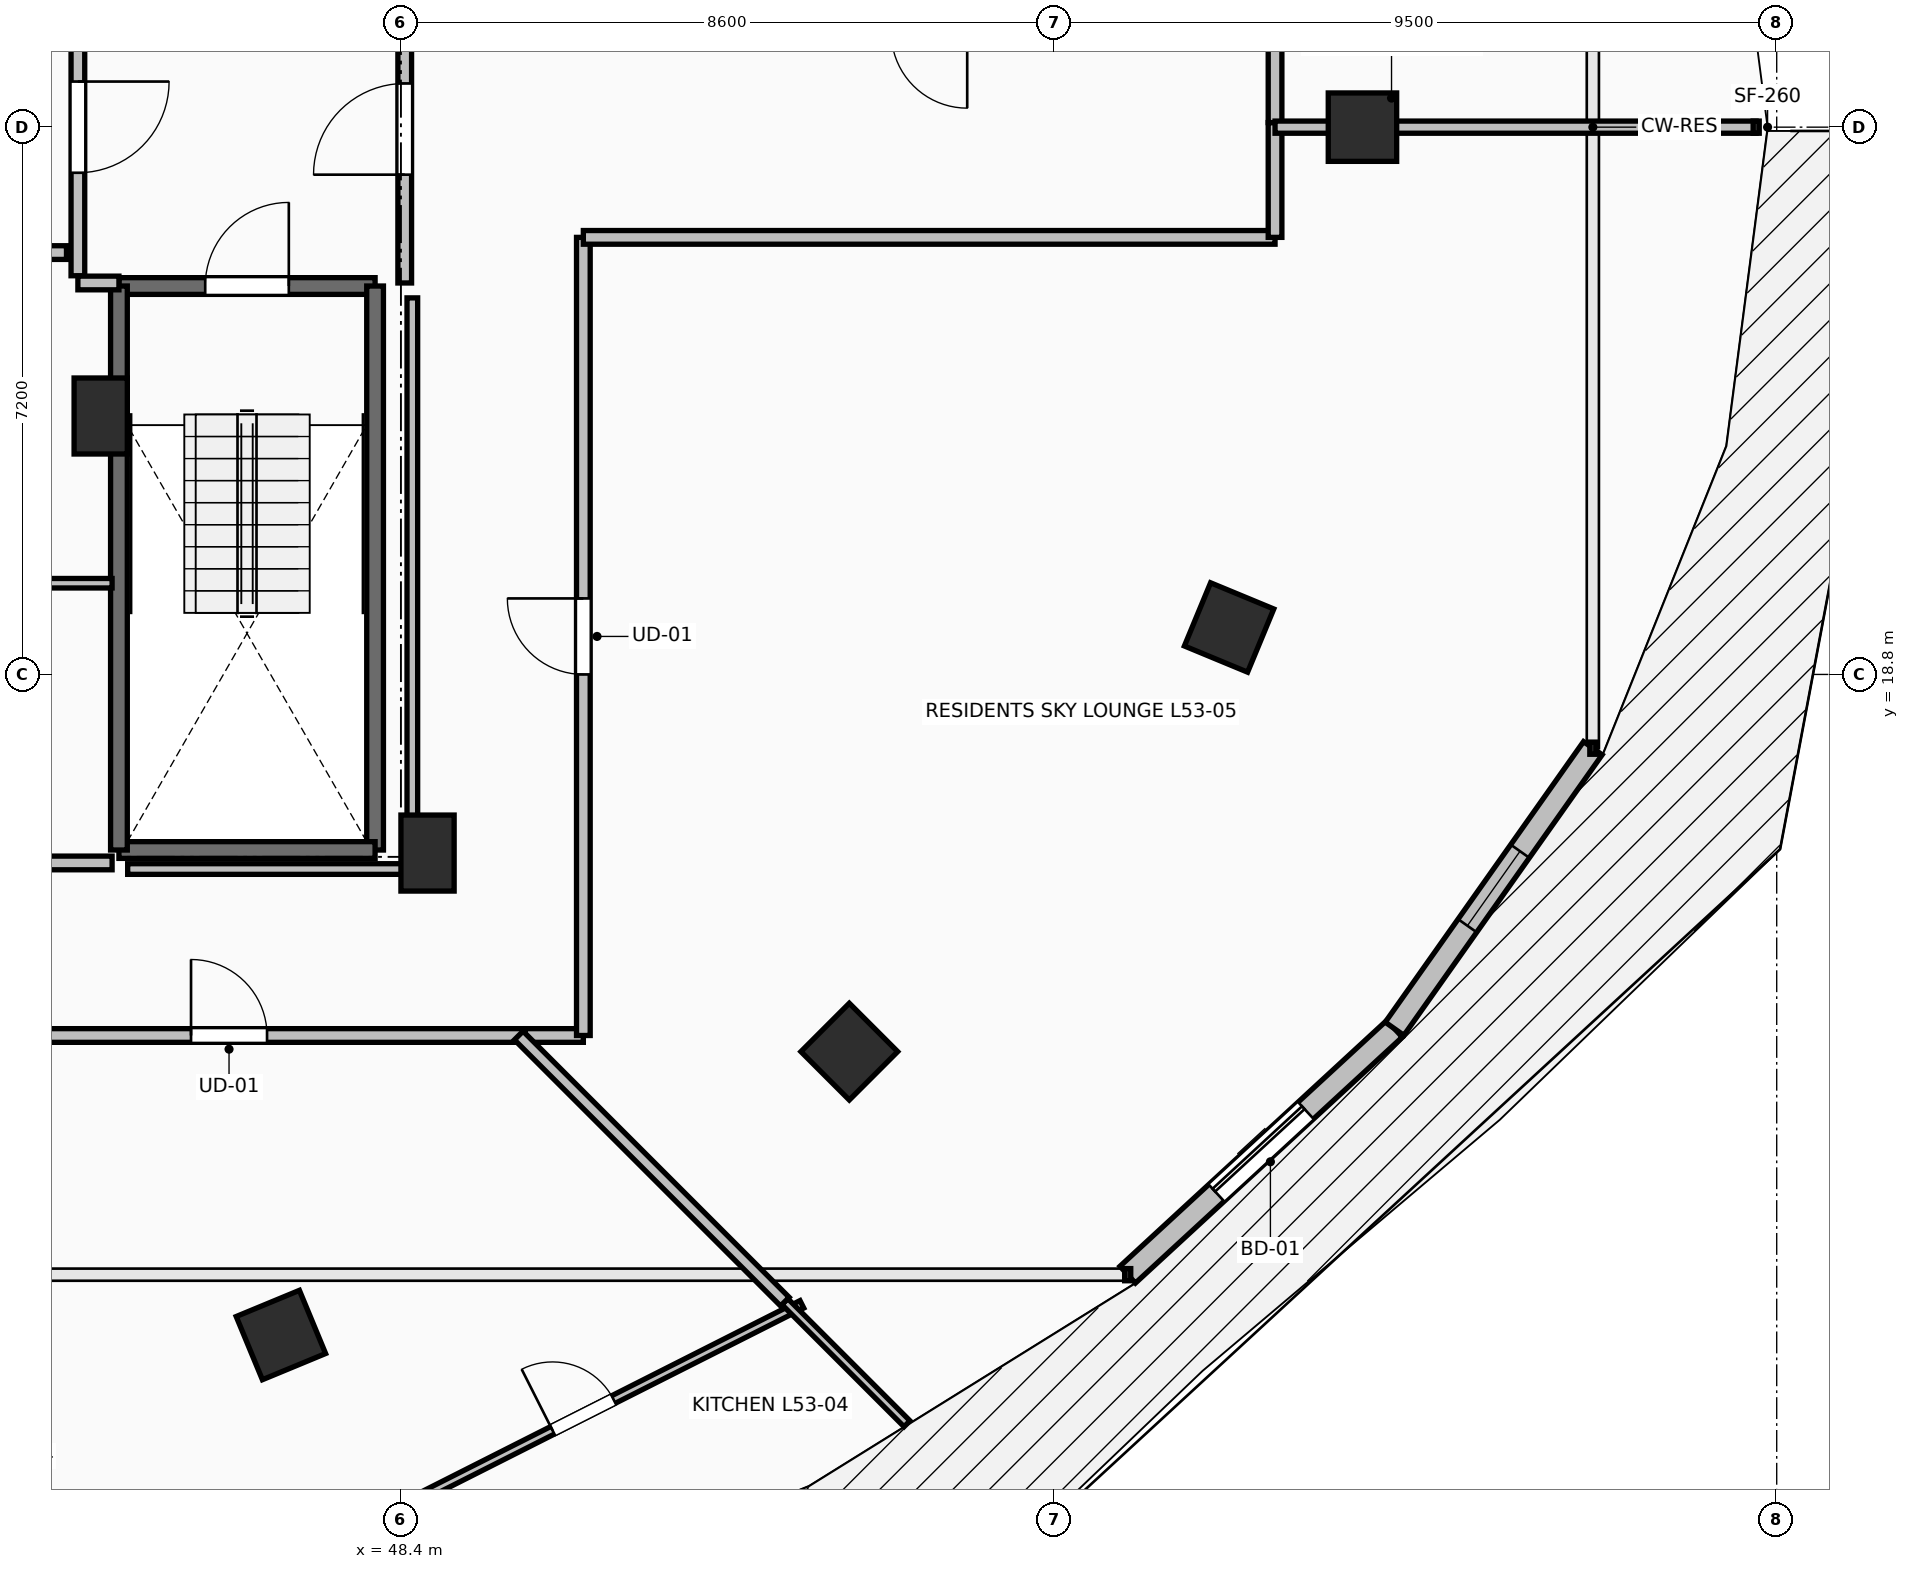
"""IFC4 building model, lengths in metres.
Left out: names, types, materials, properties, quantities, classifications, styles, units other than length and angle.
Written with IfcOpenShell. Run it as: python <this file> out.ifc"""

import sys

from ifc_helpers import new_model, si_unit, direction, frame, frame_2d, origin, origin_2d, place, context, subcontext, project, spatial, rectangle, extrude, element, fill, save


model = new_model("IFC4")
c1 = context("Model", 3, precision=1e-05, world=origin(), true_north=direction((0.0, 1.0)))
c2 = subcontext(c1, "Body", "Model", "MODEL_VIEW")
j1 = project(units=[si_unit("LENGTHUNIT", "METRE"), si_unit("PLANEANGLEUNIT", "RADIAN")], contexts=[c1])
p1 = place(None, origin())
s1 = spatial("IfcSite", under=j1, at=p1, CompositionType="ELEMENT")
p2 = place(p1, origin())
s2 = spatial("IfcBuilding", under=s1, at=p2, CompositionType="ELEMENT")
p3 = place(p2, frame((0.0, 0.0, 196.6)))
s3 = spatial("IfcBuildingStorey", under=s2, at=p3, CompositionType="ELEMENT", Elevation=196.6)
for number, where, z_axis, x_axis in (
    (1, (61.05, 26.0, 0.0), (0.0, 0.0, 1.0), (1.0, 0.0, 0.0)),
    (2, (46.821, 10.109, 0.0), (0.0, 0.0, 1.0), (0.383, -0.924, 0.0)),
    (3, (54.299, 13.838, 0.0), (0.0, 0.0, 1.0), (0.707, -0.707, 0.0)),
    (4, (59.295, 19.418, 0.0), (0.0, 0.0, 1.0), (0.924, -0.383, 0.0)),
):
    element("IfcColumn", number, at=place(p3, frame(where, z_axis=z_axis, x_axis=x_axis)), inside=s3, PredefinedType="COLUMN", context=c2, shape_type="SweptSolid", body=[
        extrude(rectangle(XDim=0.9, YDim=0.9, at=origin_2d()), origin(), (0.0, 0.0, 1.0), 3.5),
    ])
for number, where, z_axis, x_axis in (
    (5, (48.75, 16.45, 0.0), (0.0, 0.0, 1.0), (1.0, 0.0, 0.0)),
    (6, (44.45, 22.2, 0.0), (0.0, 0.0, 1.0), (1.0, 0.0, 0.0)),
):
    element("IfcColumn", number, at=place(p3, frame(where, z_axis=z_axis, x_axis=x_axis)), inside=s3, PredefinedType="PILASTER", context=c2, shape_type="SweptSolid", body=[
        extrude(rectangle(XDim=0.7, YDim=1.0, at=origin_2d()), origin(), (0.0, 0.0, 1.0), 3.5),
    ])
p4 = place(p3, frame((57.962, 10.903, 0.0), z_axis=(0.0, 0.0, 1.0), x_axis=(0.735359993374, 0.677676678177, 0.0)))
e7 = element("IfcWall", 7, at=p4, inside=s3, PredefinedType="STANDARD", context=c2, shape_type="SweptSolid", body=[
    extrude(rectangle(XDim=4.774, YDim=0.3, at=frame_2d((2.387, 0.0))), origin(), (0.0, 0.0, 1.0), 3.24),
])
p5 = place(p4, frame((1.587, 0.0, 0.0)))
e8 = element("IfcOpeningElement", 8, at=p5, cuts=e7, PredefinedType="OPENING", context=c2, shape_type="SweptSolid", body=[
    extrude(rectangle(XDim=1.6, YDim=2.3, at=frame_2d((0.8, 1.15))), frame((0.0, 0.165, 0.0), z_axis=(0.0, -1.0, 0.0), x_axis=(1.0, 0.0, 0.0)), (0.0, 0.0, 1.0), 0.33),
])
p6 = place(p3, frame((61.472, 14.139, 0.0), z_axis=(0.0, 0.0, 1.0), x_axis=(0.577168747264, 0.81662490605, 0.0)))
e9 = element("IfcWall", 9, at=p6, inside=s3, PredefinedType="STANDARD", context=c2, shape_type="SweptSolid", body=[
    extrude(rectangle(XDim=4.52, YDim=0.3, at=frame_2d((2.26, 0.0))), origin(), (0.0, 0.0, 1.0), 3.24),
])
p7 = place(p6, frame((1.66, 0.0, 0.85)))
e10 = element("IfcOpeningElement", 10, at=p7, cuts=e9, PredefinedType="OPENING", context=c2, shape_type="SweptSolid", body=[
    extrude(rectangle(XDim=1.2, YDim=2.1, at=frame_2d((0.6, 1.05))), frame((0.0, 0.165, 0.0), z_axis=(0.0, -1.0, 0.0), x_axis=(1.0, 0.0, 0.0)), (0.0, 0.0, 1.0), 0.33),
])
p8 = place(p3, frame((44.69, 23.91, 0.0), z_axis=(0.0, 0.0, 1.0), x_axis=(1.0, 0.0, 0.0)))
e11 = element("IfcWall", 11, at=p8, inside=s3, PredefinedType="SOLIDWALL", context=c2, shape_type="SweptSolid", body=[
    extrude(rectangle(XDim=3.37, YDim=0.22, at=frame_2d((1.685, 0.0))), origin(), (0.0, 0.0, 1.0), 3.24),
])
p9 = place(p8, frame((1.135, 0.0, 0.0)))
e12 = element("IfcOpeningElement", 12, at=p9, cuts=e11, PredefinedType="OPENING", context=c2, shape_type="SweptSolid", body=[
    extrude(rectangle(XDim=1.1, YDim=2.15, at=frame_2d((0.55, 1.075))), frame((0.0, 0.125, 0.0), z_axis=(0.0, -1.0, 0.0), x_axis=(1.0, 0.0, 0.0)), (0.0, 0.0, 1.0), 0.25),
])
p10 = place(p3, frame((48.06, 23.91, 0.0), z_axis=(0.0, 0.0, 1.0), x_axis=(0.0, -1.0, 0.0)))
e13 = element("IfcWall", 13, at=p10, inside=s3, PredefinedType="SOLIDWALL", context=c2, shape_type="SweptSolid", body=[
    extrude(rectangle(XDim=7.42, YDim=0.22, at=frame_2d((3.71, 0.0))), origin(), (0.0, 0.0, 1.0), 3.24),
])
p11 = place(p3, frame((48.06, 16.49, 0.0), z_axis=(0.0, 0.0, 1.0), x_axis=(-1.0, 0.0, 0.0)))
e14 = element("IfcWall", 14, at=p11, inside=s3, PredefinedType="SOLIDWALL", context=c2, shape_type="SweptSolid", body=[
    extrude(rectangle(XDim=3.37, YDim=0.22, at=frame_2d((1.685, 0.0))), origin(), (0.0, 0.0, 1.0), 3.24),
])
p12 = place(p3, frame((44.69, 16.49, 0.0), z_axis=(0.0, 0.0, 1.0), x_axis=(0.0, 1.0, 0.0)))
e15 = element("IfcWall", 15, at=p12, inside=s3, PredefinedType="SOLIDWALL", context=c2, shape_type="SweptSolid", body=[
    extrude(rectangle(XDim=7.42, YDim=0.22, at=frame_2d((3.71, 0.0))), origin(), (0.0, 0.0, 1.0), 3.24),
])
p13 = place(p3, frame((44.15, 27.955, 0.0), z_axis=(0.0, 0.0, 1.0), x_axis=(0.0, -1.0, 0.0)))
e16 = element("IfcWall", 16, at=p13, inside=s3, PredefinedType="PARTITIONING", context=c2, shape_type="SweptSolid", body=[
    extrude(rectangle(XDim=3.91, YDim=0.18, at=frame_2d((1.955, 0.0))), origin(), (0.0, 0.0, 1.0), 3.24),
])
p14 = place(p13, frame((1.355, 0.0, 0.0)))
e17 = element("IfcOpeningElement", 17, at=p14, cuts=e16, PredefinedType="OPENING", context=c2, shape_type="SweptSolid", body=[
    extrude(rectangle(XDim=1.2, YDim=2.15, at=frame_2d((0.6, 1.075))), frame((0.0, 0.105, 0.0), z_axis=(0.0, -1.0, 0.0), x_axis=(1.0, 0.0, 0.0)), (0.0, 0.0, 1.0), 0.21),
])
p15 = place(p3, frame((44.15, 23.95, 0.0), z_axis=(0.0, 0.0, 1.0), x_axis=(1.0, 0.0, 0.0)))
e18 = element("IfcWall", 18, at=p15, inside=s3, PredefinedType="PARTITIONING", context=c2, shape_type="SweptSolid", body=[
    extrude(rectangle(XDim=0.54, YDim=0.18, at=frame_2d((0.27, 0.0))), origin(), (0.0, 0.0, 1.0), 3.24),
])
p16 = place(p3, frame((48.45, 23.95, 0.0), z_axis=(0.0, 0.0, 1.0), x_axis=(0.0, 1.0, 0.0)))
e19 = element("IfcWall", 19, at=p16, inside=s3, PredefinedType="PARTITIONING", context=c2, shape_type="SweptSolid", body=[
    extrude(rectangle(XDim=4.05, YDim=0.18, at=frame_2d((2.025, 0.0))), origin(), (0.0, 0.0, 1.0), 3.24),
])
p17 = place(p16, frame((1.425, 0.0, 0.0)))
e20 = element("IfcOpeningElement", 20, at=p17, cuts=e19, PredefinedType="OPENING", context=c2, shape_type="SweptSolid", body=[
    extrude(rectangle(XDim=1.2, YDim=2.15, at=frame_2d((0.6, 1.075))), frame((0.0, 0.105, 0.0), z_axis=(0.0, -1.0, 0.0), x_axis=(1.0, 0.0, 0.0)), (0.0, 0.0, 1.0), 0.21),
])
p18 = place(p3, frame((41.555, 24.35, 0.0), z_axis=(0.0, 0.0, 1.0), x_axis=(1.0, 0.0, 0.0)))
e21 = element("IfcWall", 21, at=p18, inside=s3, PredefinedType="PARTITIONING", context=c2, shape_type="SweptSolid", body=[
    extrude(rectangle(XDim=2.445, YDim=0.18, at=frame_2d((1.223, 0.0))), origin(), (0.0, 0.0, 1.0), 3.24),
])
p19 = place(p18, frame((0.798, 0.0, 0.0)))
e22 = element("IfcOpeningElement", 22, at=p19, cuts=e21, PredefinedType="OPENING", context=c2, shape_type="SweptSolid", body=[
    extrude(rectangle(XDim=0.85, YDim=2.1, at=frame_2d((0.425, 1.05))), frame((0.0, 0.105, 0.0), z_axis=(0.0, -1.0, 0.0), x_axis=(1.0, 0.0, 0.0)), (0.0, 0.0, 1.0), 0.21),
])
p20 = place(p3, frame((44.6, 20.0, 0.0), z_axis=(0.0, 0.0, 1.0), x_axis=(-1.0, 0.0, 0.0)))
e23 = element("IfcWall", 23, at=p20, inside=s3, PredefinedType="PARTITIONING", context=c2, shape_type="SweptSolid", body=[
    extrude(rectangle(XDim=3.2, YDim=0.125, at=frame_2d((1.6, 0.0))), origin(), (0.0, 0.0, 1.0), 3.24),
])
p21 = place(p3, frame((41.4, 16.32, 0.0), z_axis=(0.0, 0.0, 1.0), x_axis=(1.0, 0.0, 0.0)))
e24 = element("IfcWall", 24, at=p21, inside=s3, PredefinedType="PARTITIONING", context=c2, shape_type="SweptSolid", body=[
    extrude(rectangle(XDim=3.2, YDim=0.18, at=frame_2d((1.6, 0.0))), origin(), (0.0, 0.0, 1.0), 3.24),
])
p22 = place(p21, frame((1.2, 0.0, 0.0)))
e25 = element("IfcOpeningElement", 25, at=p22, cuts=e24, PredefinedType="OPENING", context=c2, shape_type="SweptSolid", body=[
    extrude(rectangle(XDim=0.8, YDim=2.05, at=frame_2d((0.4, 1.025))), frame((0.0, 0.105, 0.0), z_axis=(0.0, -1.0, 0.0), x_axis=(1.0, 0.0, 0.0)), (0.0, 0.0, 1.0), 0.21),
])
p23 = place(p3, frame((42.242, 14.05, 0.0), z_axis=(0.0, 0.0, 1.0), x_axis=(1.0, 0.0, 0.0)))
e26 = element("IfcWall", 26, at=p23, inside=s3, PredefinedType="PARTITIONING", context=c2, shape_type="SweptSolid", body=[
    extrude(rectangle(XDim=7.793, YDim=0.18, at=frame_2d((3.896, 0.0))), origin(), (0.0, 0.0, 1.0), 2.432),
])
p24 = place(p23, frame((3.396, 0.0, 0.0)))
e27 = element("IfcOpeningElement", 27, at=p24, cuts=e26, PredefinedType="OPENING", context=c2, shape_type="SweptSolid", body=[
    extrude(rectangle(XDim=1.0, YDim=2.15, at=frame_2d((0.5, 1.075))), frame((0.0, 0.105, 0.0), z_axis=(0.0, -1.0, 0.0), x_axis=(1.0, 0.0, 0.0)), (0.0, 0.0, 1.0), 0.21),
])
p25 = place(p3, frame((50.035, 14.05, 0.0), z_axis=(0.0, 0.0, 1.0), x_axis=(1.0, 0.0, 0.0)))
e28 = element("IfcWall", 28, at=p25, inside=s3, PredefinedType="PARTITIONING", context=c2, shape_type="SweptSolid", body=[
    extrude(rectangle(XDim=0.765, YDim=0.18, at=frame_2d((0.383, 0.0))), origin(), (0.0, 0.0, 1.0), 2.922),
])
p26 = place(p3, frame((50.8, 14.05, 0.0), z_axis=(0.0, 0.0, 1.0), x_axis=(0.0, 1.0, 0.0)))
e29 = element("IfcWall", 29, at=p26, inside=s3, PredefinedType="PARTITIONING", context=c2, shape_type="SweptSolid", body=[
    extrude(rectangle(XDim=10.5, YDim=0.18, at=frame_2d((5.25, 0.0))), origin(), (0.0, 0.0, 1.0), 2.432),
])
p27 = place(p26, frame((4.75, 0.0, 0.0)))
e30 = element("IfcOpeningElement", 30, at=p27, cuts=e29, PredefinedType="OPENING", context=c2, shape_type="SweptSolid", body=[
    extrude(rectangle(XDim=1.0, YDim=2.15, at=frame_2d((0.5, 1.075))), frame((0.0, 0.105, 0.0), z_axis=(0.0, -1.0, 0.0), x_axis=(1.0, 0.0, 0.0)), (0.0, 0.0, 1.0), 0.21),
])
p28 = place(p3, frame((50.8, 24.55, 0.0), z_axis=(0.0, 0.0, 1.0), x_axis=(1.0, 0.0, 0.0)))
e31 = element("IfcWall", 31, at=p28, inside=s3, PredefinedType="PARTITIONING", context=c2, shape_type="SweptSolid", body=[
    extrude(rectangle(XDim=9.1, YDim=0.18, at=frame_2d((4.55, 0.0))), origin(), (0.0, 0.0, 1.0), 2.432),
])
p29 = place(p3, frame((59.9, 24.55, 0.0), z_axis=(0.0, 0.0, 1.0), x_axis=(0.0, 1.0, 0.0)))
e32 = element("IfcWall", 32, at=p29, inside=s3, PredefinedType="PARTITIONING", context=c2, shape_type="SweptSolid", body=[
    extrude(rectangle(XDim=1.51, YDim=0.18, at=frame_2d((0.755, 0.0))), origin(), (0.0, 0.0, 1.0), 2.432),
])
p30 = place(p3, frame((59.9, 26.06, 0.0), z_axis=(0.0, 0.0, 1.0), x_axis=(0.0, 1.0, 0.0)))
e33 = element("IfcWall", 33, at=p30, inside=s3, PredefinedType="PARTITIONING", context=c2, shape_type="SweptSolid", body=[
    extrude(rectangle(XDim=1.19, YDim=0.18, at=frame_2d((0.595, 0.0))), origin(), (0.0, 0.0, 1.0), 2.432),
])
p31 = place(p3, frame((47.917, 7.604, 0.0), z_axis=(0.0, 0.0, 1.0), x_axis=(0.892549884102, 0.450948671569, 0.0)))
e34 = element("IfcWall", 34, at=p31, inside=s3, PredefinedType="PARTITIONING", context=c2, shape_type="SweptSolid", body=[
    extrude(rectangle(XDim=6.451, YDim=0.11, at=frame_2d((3.226, 0.0))), origin(), (0.0, 0.0, 1.0), 3.24),
])
p32 = place(p31, frame((2.776, 0.0, 0.0)))
e35 = element("IfcOpeningElement", 35, at=p32, cuts=e34, PredefinedType="OPENING", context=c2, shape_type="SweptSolid", body=[
    extrude(rectangle(XDim=0.9, YDim=2.1, at=frame_2d((0.45, 1.05))), frame((0.0, 0.07, 0.0), z_axis=(0.0, -1.0, 0.0), x_axis=(1.0, 0.0, 0.0)), (0.0, 0.0, 1.0), 0.14),
])
p33 = place(p3, frame((53.451, 10.549, 0.0), z_axis=(0.0, 0.0, 1.0), x_axis=(0.707106781187, -0.707106781187, 0.0)))
e36 = element("IfcWall", 36, at=p33, inside=s3, PredefinedType="PARTITIONING", context=c2, shape_type="SweptSolid", body=[
    extrude(rectangle(XDim=2.273, YDim=0.11, at=frame_2d((1.136, 0.0))), origin(), (0.0, 0.0, 1.0), 3.24),
])
p34 = place(p3, frame((53.451, 10.549, 0.0), z_axis=(0.0, 0.0, 1.0), x_axis=(-0.707106781187, 0.707106781187, 0.0)))
e37 = element("IfcWall", 37, at=p34, inside=s3, PredefinedType="PARTITIONING", context=c2, shape_type="SweptSolid", body=[
    extrude(rectangle(XDim=4.951, YDim=0.16, at=frame_2d((2.476, 0.0))), origin(), (0.0, 0.0, 1.0), 2.774),
])
p35 = place(p3, frame((66.229, 26.0, 0.0), z_axis=(0.0, 0.0, 1.0), x_axis=(-1.0, 0.0, 0.0)))
e38 = element("IfcWall", 38, at=p35, inside=s3, PredefinedType="PARTITIONING", context=c2, shape_type="SweptSolid", body=[
    extrude(rectangle(XDim=6.329, YDim=0.16, at=frame_2d((3.165, 0.0))), origin(), (0.0, 0.0, 1.0), 2.432),
])
p36 = place(p3, frame((48.55, 16.24, 0.0), z_axis=(0.0, 0.0, 1.0), x_axis=(0.0, 1.0, 0.0)))
e39 = element("IfcWall", 39, at=p36, inside=s3, PredefinedType="PARTITIONING", context=c2, shape_type="SweptSolid", body=[
    extrude(rectangle(XDim=7.514, YDim=0.14, at=frame_2d((3.757, 0.0))), origin(), (0.0, 0.0, 1.0), 2.432),
])
p37 = place(p3, frame((44.805, 16.24, 0.0), z_axis=(0.0, 0.0, 1.0), x_axis=(1.0, 0.0, 0.0)))
e40 = element("IfcWall", 40, at=p37, inside=s3, PredefinedType="PARTITIONING", context=c2, shape_type="SweptSolid", body=[
    extrude(rectangle(XDim=3.745, YDim=0.14, at=frame_2d((1.873, 0.0))), origin(), (0.0, 0.0, 1.0), 2.432),
])
p38 = place(p5, origin())
e41 = element("IfcDoor", 41, at=p38, inside=s3, OperationType="SLIDING_TO_LEFT", PredefinedType="DOOR", context=c2, shape_type="SweptSolid", body=[
    extrude(rectangle(XDim=1.6, YDim=2.3, at=frame_2d((0.8, 1.15))), frame((0.0, 0.025, 0.0), z_axis=(0.0, -1.0, 0.0), x_axis=(1.0, 0.0, 0.0)), (0.0, 0.0, 1.0), 0.05),
])
fill(e8, e41)
p39 = place(p7, origin())
e42 = element("IfcWindow", 42, at=p39, inside=s3, PartitioningType="SINGLE_PANEL", PredefinedType="WINDOW", context=c2, shape_type="SweptSolid", body=[
    extrude(rectangle(XDim=1.2, YDim=2.1, at=frame_2d((0.6, 1.05))), frame((0.0, 0.03, 0.0), z_axis=(0.0, -1.0, 0.0), x_axis=(1.0, 0.0, 0.0)), (0.0, 0.0, 1.0), 0.06),
])
fill(e10, e42)
p40 = place(p9, origin())
e43 = element("IfcDoor", 43, at=p40, inside=s3, OperationType="SINGLE_SWING_RIGHT", PredefinedType="DOOR", context=c2, shape_type="SweptSolid", body=[
    extrude(rectangle(XDim=1.1, YDim=2.15, at=frame_2d((0.55, 1.075))), frame((0.0, 0.025, 0.0), z_axis=(0.0, -1.0, 0.0), x_axis=(1.0, 0.0, 0.0)), (0.0, 0.0, 1.0), 0.05),
])
fill(e12, e43)
p41 = place(p14, origin())
e44 = element("IfcDoor", 44, at=p41, inside=s3, OperationType="SINGLE_SWING_LEFT", PredefinedType="DOOR", context=c2, shape_type="SweptSolid", body=[
    extrude(rectangle(XDim=1.2, YDim=2.15, at=frame_2d((0.6, 1.075))), frame((0.0, 0.025, 0.0), z_axis=(0.0, -1.0, 0.0), x_axis=(1.0, 0.0, 0.0)), (0.0, 0.0, 1.0), 0.05),
])
fill(e17, e44)
p42 = place(p17, origin())
e45 = element("IfcDoor", 45, at=p42, inside=s3, OperationType="SINGLE_SWING_LEFT", PredefinedType="DOOR", context=c2, shape_type="SweptSolid", body=[
    extrude(rectangle(XDim=1.2, YDim=2.15, at=frame_2d((0.6, 1.075))), frame((0.0, 0.025, 0.0), z_axis=(0.0, -1.0, 0.0), x_axis=(1.0, 0.0, 0.0)), (0.0, 0.0, 1.0), 0.05),
])
fill(e20, e45)
p43 = place(p24, origin())
e46 = element("IfcDoor", 46, at=p43, inside=s3, OperationType="SINGLE_SWING_LEFT", PredefinedType="DOOR", context=c2, shape_type="SweptSolid", body=[
    extrude(rectangle(XDim=1.0, YDim=2.15, at=frame_2d((0.5, 1.075))), frame((0.0, 0.025, 0.0), z_axis=(0.0, -1.0, 0.0), x_axis=(1.0, 0.0, 0.0)), (0.0, 0.0, 1.0), 0.05),
])
fill(e27, e46)
p44 = place(p27, origin())
e47 = element("IfcDoor", 47, at=p44, inside=s3, OperationType="SINGLE_SWING_RIGHT", PredefinedType="DOOR", context=c2, shape_type="SweptSolid", body=[
    extrude(rectangle(XDim=1.0, YDim=2.15, at=frame_2d((0.5, 1.075))), frame((0.0, 0.025, 0.0), z_axis=(0.0, -1.0, 0.0), x_axis=(1.0, 0.0, 0.0)), (0.0, 0.0, 1.0), 0.05),
])
fill(e30, e47)
p45 = place(p32, origin())
e48 = element("IfcDoor", 48, at=p45, inside=s3, OperationType="SINGLE_SWING_LEFT", PredefinedType="DOOR", context=c2, shape_type="SweptSolid", body=[
    extrude(rectangle(XDim=0.9, YDim=2.1, at=frame_2d((0.45, 1.05))), frame((0.0, 0.025, 0.0), z_axis=(0.0, -1.0, 0.0), x_axis=(1.0, 0.0, 0.0)), (0.0, 0.0, 1.0), 0.05),
])
fill(e35, e48)
save(model, sys.argv[1])
